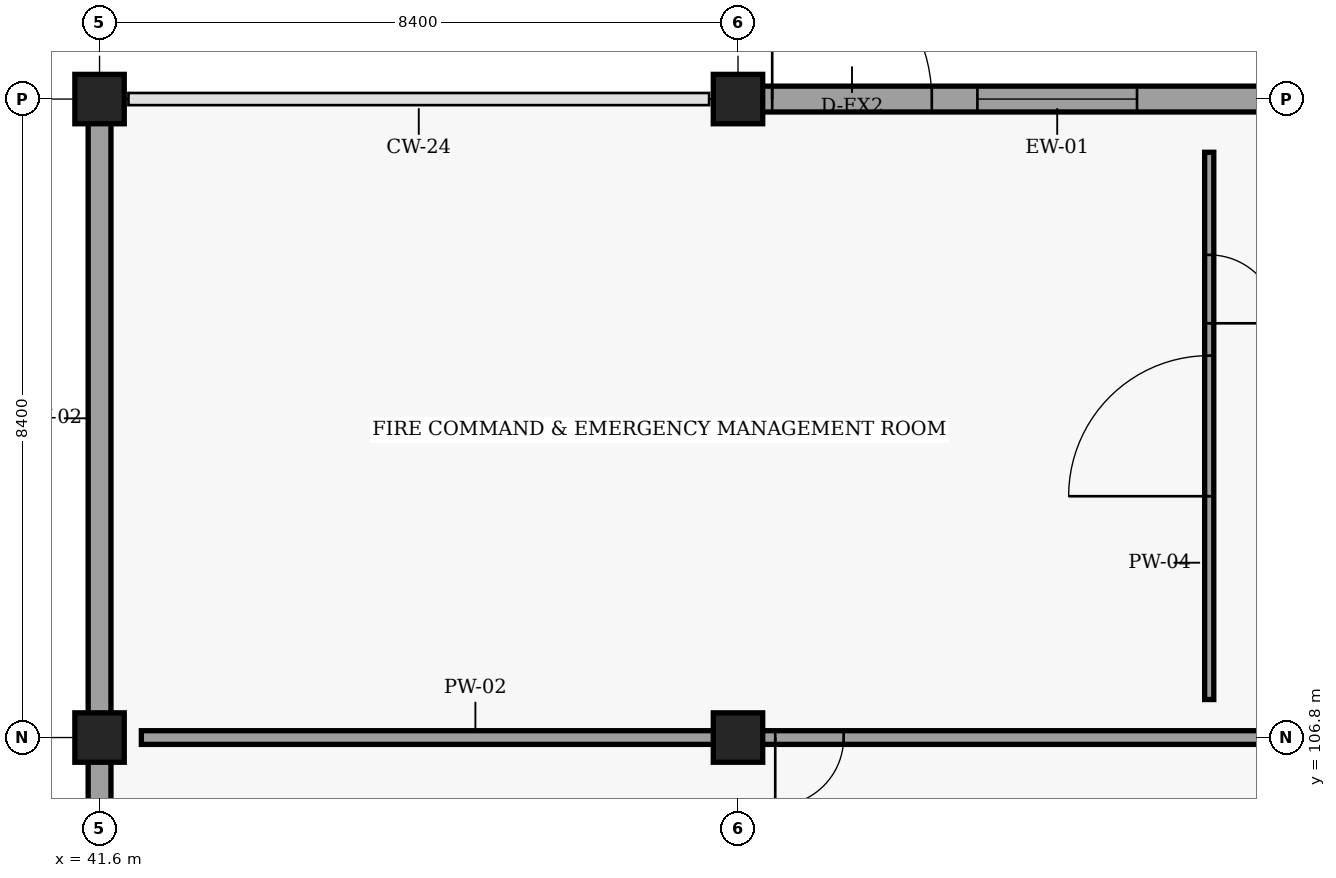
"""IFC4 building model, lengths in metres.
Left out: names, types, materials, properties, quantities, classifications, styles, units other than length and angle.
Written with IfcOpenShell. Run it as: python <this file> out.ifc"""

import sys

from ifc_helpers import new_model, si_unit, direction, frame, frame_2d, origin, origin_2d, place, context, subcontext, project, spatial, rectangle, extrude, element, fill, save


model = new_model("IFC4")
c1 = context("Model", 3, precision=1e-05, world=origin(), true_north=direction((0.0, 1.0)))
c2 = subcontext(c1, "Body", "Model", "MODEL_VIEW")
j1 = project(units=[si_unit("LENGTHUNIT", "METRE"), si_unit("PLANEANGLEUNIT", "RADIAN")], contexts=[c1])
p1 = place(None, origin())
s1 = spatial("IfcSite", under=j1, at=p1, CompositionType="ELEMENT")
p2 = place(p1, origin())
s2 = spatial("IfcBuilding", under=s1, at=p2, CompositionType="ELEMENT")
p3 = place(p2, origin())
s3 = spatial("IfcBuildingStorey", under=s2, at=p3, CompositionType="ELEMENT", Elevation=0.0)
for number, where, z_axis, x_axis in (
    (1, (41.6, 106.8, 0.0), (0.0, 0.0, 1.0), (1.0, 0.0, 0.0)),
    (2, (41.6, 115.2, 0.0), (0.0, 0.0, 1.0), (1.0, 0.0, 0.0)),
    (3, (50.0, 106.8, 0.0), (0.0, 0.0, 1.0), (1.0, 0.0, 0.0)),
    (4, (50.0, 115.2, 0.0), (0.0, 0.0, 1.0), (1.0, 0.0, 0.0)),
):
    element("IfcColumn", number, at=place(p3, frame(where, z_axis=z_axis, x_axis=x_axis)), inside=s3, PredefinedType="COLUMN", context=c2, shape_type="SweptSolid", body=[
        extrude(rectangle(XDim=0.65, YDim=0.65, at=origin_2d()), origin(), (0.0, 0.0, 1.0), 4.8),
    ])
p4 = place(p3, frame((50.1, 115.2, 0.0), z_axis=(0.0, 0.0, 1.0), x_axis=(1.0, 0.0, 0.0)))
e5 = element("IfcWall", 5, at=p4, inside=s3, PredefinedType="SOLIDWALL", context=c2, shape_type="SweptSolid", body=[
    extrude(rectangle(XDim=8.2, YDim=0.34, at=frame_2d((4.1, 0.0))), origin(), (0.0, 0.0, 1.0), 3.675),
])
p5 = place(p4, frame((3.05, 0.0, 0.95)))
e6 = element("IfcOpeningElement", 6, at=p5, cuts=e5, PredefinedType="OPENING", context=c2, shape_type="SweptSolid", body=[
    extrude(rectangle(XDim=2.1, YDim=1.8, at=frame_2d((1.05, 0.9))), frame((0.0, 0.18, 0.0), z_axis=(0.0, -1.0, 0.0), x_axis=(1.0, 0.0, 0.0)), (0.0, 0.0, 1.0), 0.36),
])
p6 = place(p4, frame((0.35, 0.0, 0.0)))
e7 = element("IfcOpeningElement", 7, at=p6, cuts=e5, PredefinedType="OPENING", context=c2, shape_type="SweptSolid", body=[
    extrude(rectangle(XDim=2.1, YDim=2.35, at=frame_2d((1.05, 1.175))), frame((0.0, 0.18, 0.0), z_axis=(0.0, -1.0, 0.0), x_axis=(1.0, 0.0, 0.0)), (0.0, 0.0, 1.0), 0.36),
])
p7 = place(p3, frame((41.6, 98.5, 0.0), z_axis=(0.0, 0.0, 1.0), x_axis=(0.0, 1.0, 0.0)))
e8 = element("IfcWall", 8, at=p7, inside=s3, PredefinedType="SOLIDWALL", context=c2, shape_type="SweptSolid", body=[
    extrude(rectangle(XDim=8.2, YDim=0.3, at=frame_2d((4.1, 0.0))), origin(), (0.0, 0.0, 1.0), 4.075),
])
p8 = place(p7, frame((2.15, 0.0, 0.0)))
e9 = element("IfcOpeningElement", 9, at=p8, cuts=e8, PredefinedType="OPENING", context=c2, shape_type="SweptSolid", body=[
    extrude(rectangle(XDim=2.1, YDim=2.35, at=frame_2d((1.05, 1.175))), frame((0.0, 0.16, 0.0), z_axis=(0.0, -1.0, 0.0), x_axis=(1.0, 0.0, 0.0)), (0.0, 0.0, 1.0), 0.32),
])
p9 = place(p3, frame((41.6, 106.9, 0.0), z_axis=(0.0, 0.0, 1.0), x_axis=(0.0, 1.0, 0.0)))
e10 = element("IfcWall", 10, at=p9, inside=s3, PredefinedType="SOLIDWALL", context=c2, shape_type="SweptSolid", body=[
    extrude(rectangle(XDim=8.2, YDim=0.3, at=frame_2d((4.1, 0.0))), origin(), (0.0, 0.0, 1.0), 4.075),
])
p10 = place(p3, frame((42.15, 106.8, 0.0), z_axis=(0.0, 0.0, 1.0), x_axis=(1.0, 0.0, 0.0)))
e11 = element("IfcWall", 11, at=p10, inside=s3, PredefinedType="PARTITIONING", context=c2, shape_type="SweptSolid", body=[
    extrude(rectangle(XDim=17.58, YDim=0.18, at=frame_2d((8.79, 0.0))), origin(), (0.0, 0.0, 1.0), 3.675),
])
p11 = place(p10, frame((8.34, 0.0, 0.0)))
e12 = element("IfcOpeningElement", 12, at=p11, cuts=e11, PredefinedType="OPENING", context=c2, shape_type="SweptSolid", body=[
    extrude(rectangle(XDim=0.9, YDim=2.06, at=frame_2d((0.45, 1.03))), frame((0.0, 0.1, 0.0), z_axis=(0.0, -1.0, 0.0), x_axis=(1.0, 0.0, 0.0)), (0.0, 0.0, 1.0), 0.2),
])
p12 = place(p3, frame((56.2, 107.3, 0.0), z_axis=(0.0, 0.0, 1.0), x_axis=(0.0, 1.0, 0.0)))
e13 = element("IfcWall", 13, at=p12, inside=s3, PredefinedType="PARTITIONING", context=c2, shape_type="SweptSolid", body=[
    extrude(rectangle(XDim=7.2, YDim=0.12, at=frame_2d((3.6, 0.0))), origin(), (0.0, 0.0, 1.0), 4.545),
])
p13 = place(p12, frame((2.675, 0.0, 0.0)))
e14 = element("IfcOpeningElement", 14, at=p13, cuts=e13, PredefinedType="OPENING", context=c2, shape_type="SweptSolid", body=[
    extrude(rectangle(XDim=1.85, YDim=2.22, at=frame_2d((0.925, 1.11))), frame((0.0, 0.07, 0.0), z_axis=(0.0, -1.0, 0.0), x_axis=(1.0, 0.0, 0.0)), (0.0, 0.0, 1.0), 0.14),
])
p14 = place(p12, frame((4.95, 0.0, 0.0)))
e15 = element("IfcOpeningElement", 15, at=p14, cuts=e13, PredefinedType="OPENING", context=c2, shape_type="SweptSolid", body=[
    extrude(rectangle(XDim=0.9, YDim=2.06, at=frame_2d((0.45, 1.03))), frame((0.0, 0.07, 0.0), z_axis=(0.0, -1.0, 0.0), x_axis=(1.0, 0.0, 0.0)), (0.0, 0.0, 1.0), 0.14),
])
p15 = place(p5, origin())
e16 = element("IfcWindow", 16, at=p15, inside=s3, PartitioningType="SINGLE_PANEL", PredefinedType="WINDOW", context=c2, shape_type="SweptSolid", body=[
    extrude(rectangle(XDim=2.1, YDim=1.8, at=frame_2d((1.05, 0.9))), frame((0.0, 0.03, 0.0), z_axis=(0.0, -1.0, 0.0), x_axis=(1.0, 0.0, 0.0)), (0.0, 0.0, 1.0), 0.06),
])
fill(e6, e16)
p16 = place(p6, origin())
e17 = element("IfcDoor", 17, at=p16, inside=s3, OperationType="DOUBLE_DOOR_SINGLE_SWING", PredefinedType="DOOR", context=c2, shape_type="SweptSolid", body=[
    extrude(rectangle(XDim=2.1, YDim=2.35, at=frame_2d((1.05, 1.175))), frame((0.0, 0.025, 0.0), z_axis=(0.0, -1.0, 0.0), x_axis=(1.0, 0.0, 0.0)), (0.0, 0.0, 1.0), 0.05),
])
fill(e7, e17)
p17 = place(p11, origin())
e18 = element("IfcDoor", 18, at=p17, inside=s3, OperationType="SINGLE_SWING_RIGHT", PredefinedType="DOOR", context=c2, shape_type="SweptSolid", body=[
    extrude(rectangle(XDim=0.9, YDim=2.06, at=frame_2d((0.45, 1.03))), frame((0.0, 0.025, 0.0), z_axis=(0.0, -1.0, 0.0), x_axis=(1.0, 0.0, 0.0)), (0.0, 0.0, 1.0), 0.05),
])
fill(e12, e18)
p18 = place(p13, origin())
e19 = element("IfcDoor", 19, at=p18, inside=s3, OperationType="DOUBLE_DOOR_SINGLE_SWING", PredefinedType="DOOR", context=c2, shape_type="SweptSolid", body=[
    extrude(rectangle(XDim=1.85, YDim=2.22, at=frame_2d((0.925, 1.11))), frame((0.0, 0.025, 0.0), z_axis=(0.0, -1.0, 0.0), x_axis=(1.0, 0.0, 0.0)), (0.0, 0.0, 1.0), 0.05),
])
fill(e14, e19)
p19 = place(p14, origin())
e20 = element("IfcDoor", 20, at=p19, inside=s3, OperationType="SINGLE_SWING_RIGHT", PredefinedType="DOOR", context=c2, shape_type="SweptSolid", body=[
    extrude(rectangle(XDim=0.9, YDim=2.06, at=frame_2d((0.45, 1.03))), frame((0.0, 0.025, 0.0), z_axis=(0.0, -1.0, 0.0), x_axis=(1.0, 0.0, 0.0)), (0.0, 0.0, 1.0), 0.05),
])
fill(e15, e20)
save(model, sys.argv[1])
